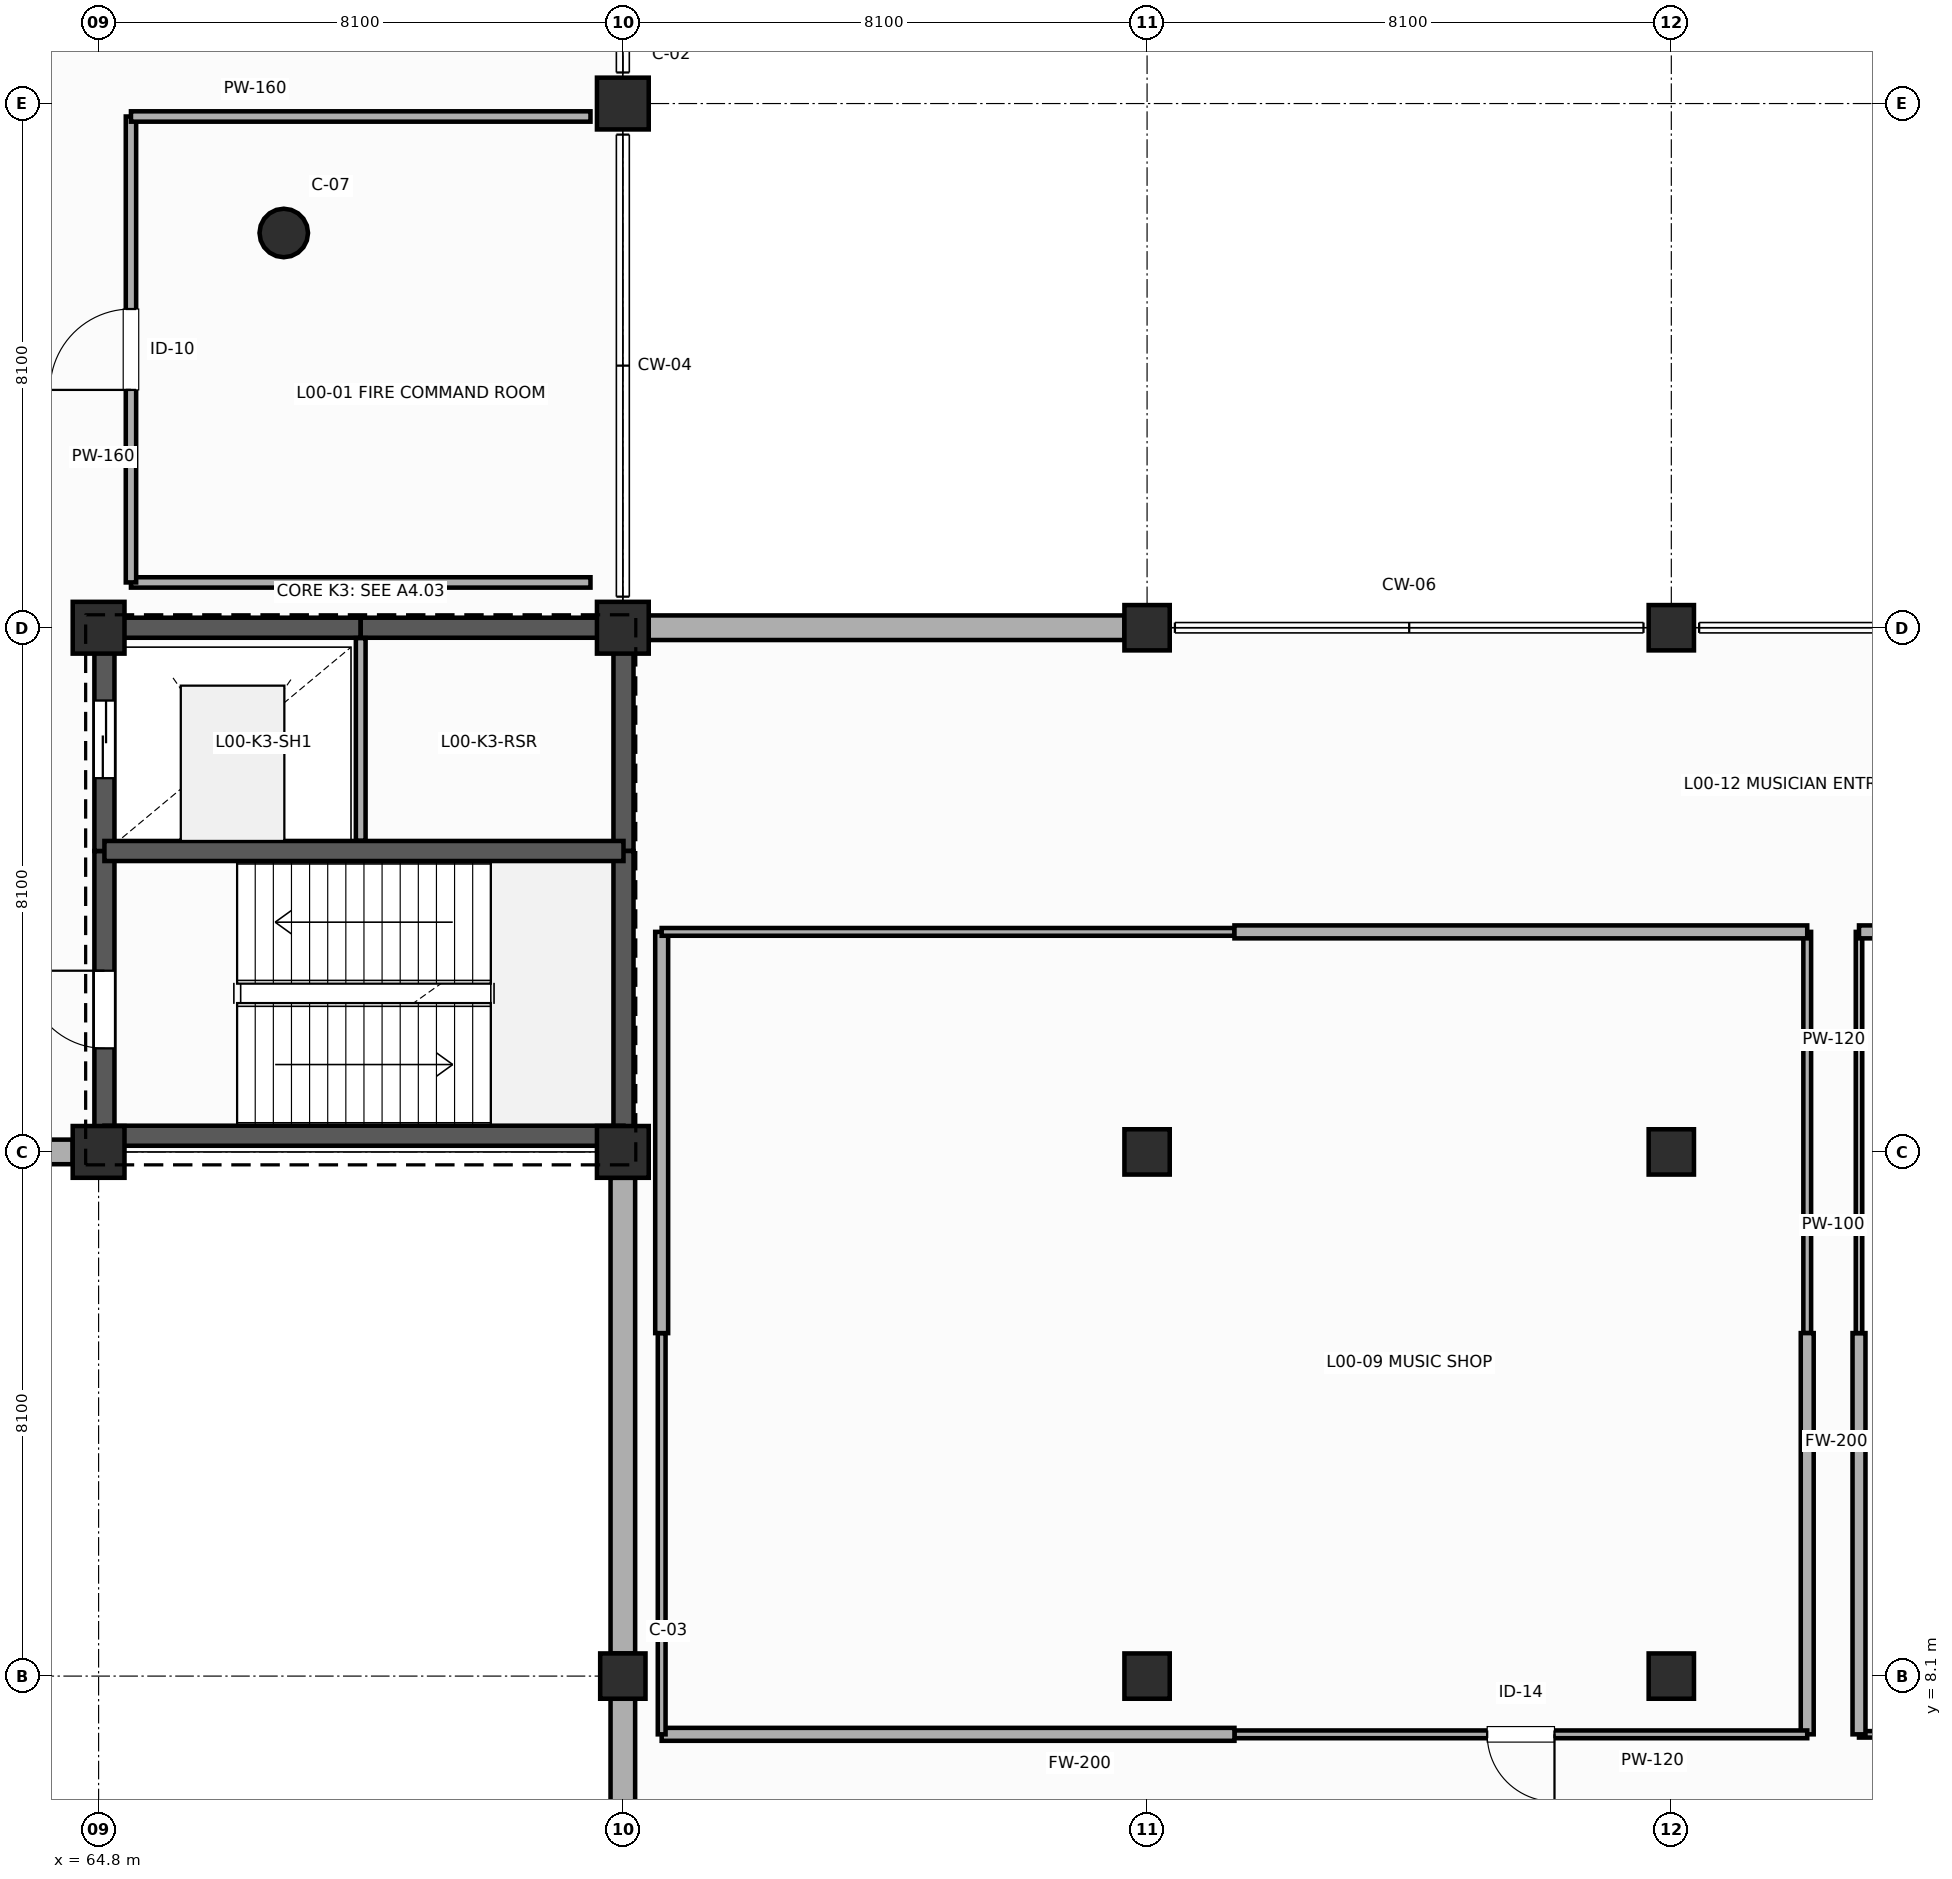
"""IFC4 building model, lengths in metres.
Left out: names, types, materials, properties, quantities, classifications, styles, units other than length and angle.
Written with IfcOpenShell. Run it as: python <this file> out.ifc"""

import sys

from ifc_helpers import new_model, si_unit, direction, frame, frame_2d, origin, origin_2d, place, context, subcontext, project, spatial, rectangle, circle, extrude, element, fill, save


model = new_model("IFC4")
c1 = context("Model", 3, precision=1e-05, world=origin(), true_north=direction((0.0, 1.0)))
c2 = subcontext(c1, "Body", "Model", "MODEL_VIEW")
j1 = project(units=[si_unit("LENGTHUNIT", "METRE"), si_unit("PLANEANGLEUNIT", "RADIAN")], contexts=[c1])
p1 = place(None, origin())
s1 = spatial("IfcSite", under=j1, at=p1, CompositionType="ELEMENT")
p2 = place(p1, origin())
s2 = spatial("IfcBuilding", under=s1, at=p2, CompositionType="ELEMENT")
p3 = place(p2, origin())
s3 = spatial("IfcBuildingStorey", under=s2, at=p3, CompositionType="ELEMENT", Elevation=0.0)
for number, where, z_axis, x_axis in (
    (1, (64.8, 16.2, 0.0), (0.0, 0.0, 1.0), (1.0, 0.0, 0.0)),
    (2, (64.8, 24.3, 0.0), (0.0, 0.0, 1.0), (1.0, 0.0, 0.0)),
):
    element("IfcColumn", number, at=place(p3, frame(where, z_axis=z_axis, x_axis=x_axis)), inside=s3, PredefinedType="COLUMN", context=c2, shape_type="SweptSolid", body=[
        extrude(rectangle(XDim=0.8, YDim=0.8, at=origin_2d()), origin(), (0.0, 0.0, 1.0), 5.4),
    ])
p4 = place(p3, frame((72.9, 8.1, 0.0), z_axis=(0.0, 0.0, 1.0), x_axis=(1.0, 0.0, 0.0)))
e3 = element("IfcColumn", 3, at=p4, inside=s3, PredefinedType="COLUMN", context=c2, shape_type="SweptSolid", body=[
    extrude(rectangle(XDim=0.7, YDim=0.7, at=origin_2d()), origin(), (0.0, 0.0, 1.0), 5.4),
])
for number, where, z_axis, x_axis in (
    (4, (72.9, 16.2, 0.0), (0.0, 0.0, 1.0), (1.0, 0.0, 0.0)),
    (5, (72.9, 24.3, 0.0), (0.0, 0.0, 1.0), (1.0, 0.0, 0.0)),
    (6, (72.9, 32.4, 0.0), (0.0, 0.0, 1.0), (1.0, 0.0, 0.0)),
):
    element("IfcColumn", number, at=place(p3, frame(where, z_axis=z_axis, x_axis=x_axis)), inside=s3, PredefinedType="COLUMN", context=c2, shape_type="SweptSolid", body=[
        extrude(rectangle(XDim=0.8, YDim=0.8, at=origin_2d()), origin(), (0.0, 0.0, 1.0), 5.4),
    ])
for number, where, z_axis, x_axis in (
    (7, (81.0, 8.1, 0.0), (0.0, 0.0, 1.0), (1.0, 0.0, 0.0)),
    (8, (81.0, 16.2, 0.0), (0.0, 0.0, 1.0), (1.0, 0.0, 0.0)),
    (9, (81.0, 24.3, 0.0), (0.0, 0.0, 1.0), (1.0, 0.0, 0.0)),
    (10, (89.1, 8.1, 0.0), (0.0, 0.0, 1.0), (1.0, 0.0, 0.0)),
    (11, (89.1, 16.2, 0.0), (0.0, 0.0, 1.0), (1.0, 0.0, 0.0)),
    (12, (89.1, 24.3, 0.0), (0.0, 0.0, 1.0), (1.0, 0.0, 0.0)),
):
    element("IfcColumn", number, at=place(p3, frame(where, z_axis=z_axis, x_axis=x_axis)), inside=s3, PredefinedType="COLUMN", context=c2, shape_type="SweptSolid", body=[
        extrude(rectangle(XDim=0.7, YDim=0.7, at=origin_2d()), origin(), (0.0, 0.0, 1.0), 5.4),
    ])
p5 = place(p3, frame((67.661, 30.4, 0.0), z_axis=(0.0, 0.0, 1.0), x_axis=(1.0, 0.0, 0.0)))
e13 = element("IfcColumn", 13, at=p5, inside=s3, PredefinedType="COLUMN", context=c2, shape_type="SweptSolid", body=[
    extrude(circle(Radius=0.375, at=origin_2d()), origin(), (0.0, 0.0, 1.0), 5.4),
])
p6 = place(p3, frame((73.3, 24.3, 0.0), z_axis=(0.0, 0.0, 1.0), x_axis=(1.0, 0.0, 0.0)))
e14 = element("IfcWall", 14, at=p6, inside=s3, PredefinedType="SOLIDWALL", context=c2, shape_type="SweptSolid", body=[
    extrude(rectangle(XDim=7.35, YDim=0.38, at=frame_2d((3.675, 0.0))), origin(), (0.0, 0.0, 1.0), 4.625),
])
p7 = place(p3, frame((56.7, 16.2, 0.0), z_axis=(0.0, 0.0, 1.0), x_axis=(1.0, 0.0, 0.0)))
e15 = element("IfcWall", 15, at=p7, inside=s3, PredefinedType="SOLIDWALL", context=c2, shape_type="SweptSolid", body=[
    extrude(rectangle(XDim=7.7, YDim=0.38, at=frame_2d((3.85, 0.0))), origin(), (0.0, 0.0, 1.0), 5.1),
])
p8 = place(p3, frame((72.9, 15.8, 0.0), z_axis=(0.0, 0.0, 1.0), x_axis=(0.0, -1.0, 0.0)))
e16 = element("IfcWall", 16, at=p8, inside=s3, PredefinedType="SOLIDWALL", context=c2, shape_type="SweptSolid", body=[
    extrude(rectangle(XDim=7.35, YDim=0.38, at=frame_2d((3.675, 0.0))), origin(), (0.0, 0.0, 1.0), 4.737),
])
p9 = place(p3, frame((72.9, 7.75, 0.0), z_axis=(0.0, 0.0, 1.0), x_axis=(0.0, -1.0, 0.0)))
e17 = element("IfcWall", 17, at=p9, inside=s3, PredefinedType="SOLIDWALL", context=c2, shape_type="SweptSolid", body=[
    extrude(rectangle(XDim=3.75, YDim=0.38, at=frame_2d((1.875, 0.0))), origin(), (0.0, 0.0, 1.0), 4.737),
])
p10 = place(p3, frame((64.89, 16.45, 0.0), z_axis=(0.0, 0.0, 1.0), x_axis=(0.0, 1.0, 0.0)))
e18 = element("IfcWall", 18, at=p10, inside=s3, PredefinedType="SHEAR", context=c2, shape_type="SweptSolid", body=[
    extrude(rectangle(XDim=4.4, YDim=0.31, at=frame_2d((2.2, 0.0))), origin(), (0.0, 0.0, 1.0), 5.4),
])
p11 = place(p10, frame((1.35, 0.0, 0.0)))
e19 = element("IfcOpeningElement", 19, at=p11, cuts=e18, PredefinedType="OPENING", context=c2, shape_type="SweptSolid", body=[
    extrude(rectangle(XDim=1.2, YDim=2.25, at=frame_2d((0.6, 1.125))), frame((0.0, 0.165, 0.0), z_axis=(0.0, -1.0, 0.0), x_axis=(1.0, 0.0, 0.0)), (0.0, 0.0, 1.0), 0.33),
])
p12 = place(p3, frame((64.89, 20.85, 0.0), z_axis=(0.0, 0.0, 1.0), x_axis=(0.0, 1.0, 0.0)))
e20 = element("IfcWall", 20, at=p12, inside=s3, PredefinedType="SHEAR", context=c2, shape_type="SweptSolid", body=[
    extrude(rectangle(XDim=3.45, YDim=0.31, at=frame_2d((1.725, 0.0))), origin(), (0.0, 0.0, 1.0), 5.4),
])
p13 = place(p12, frame((1.125, 0.0, 0.0)))
e21 = element("IfcOpeningElement", 21, at=p13, cuts=e20, PredefinedType="OPENING", context=c2, shape_type="SweptSolid", body=[
    extrude(rectangle(XDim=1.2, YDim=2.2, at=frame_2d((0.6, 1.1))), frame((0.0, 0.165, 0.0), z_axis=(0.0, -1.0, 0.0), x_axis=(1.0, 0.0, 0.0)), (0.0, 0.0, 1.0), 0.33),
])
p14 = place(p3, frame((64.89, 24.3, 0.0), z_axis=(0.0, 0.0, 1.0), x_axis=(1.0, 0.0, 0.0)))
e22 = element("IfcWall", 22, at=p14, inside=s3, PredefinedType="SHEAR", context=c2, shape_type="SweptSolid", body=[
    extrude(rectangle(XDim=3.96, YDim=0.31, at=frame_2d((1.98, 0.0))), origin(), (0.0, 0.0, 1.0), 5.4),
])
p15 = place(p3, frame((68.85, 24.3, 0.0), z_axis=(0.0, 0.0, 1.0), x_axis=(1.0, 0.0, 0.0)))
e23 = element("IfcWall", 23, at=p15, inside=s3, PredefinedType="SHEAR", context=c2, shape_type="SweptSolid", body=[
    extrude(rectangle(XDim=4.06, YDim=0.31, at=frame_2d((2.03, 0.0))), origin(), (0.0, 0.0, 1.0), 5.4),
])
p16 = place(p3, frame((72.91, 24.3, 0.0), z_axis=(0.0, 0.0, 1.0), x_axis=(0.0, -1.0, 0.0)))
e24 = element("IfcWall", 24, at=p16, inside=s3, PredefinedType="SHEAR", context=c2, shape_type="SweptSolid", body=[
    extrude(rectangle(XDim=3.45, YDim=0.31, at=frame_2d((1.725, 0.0))), origin(), (0.0, 0.0, 1.0), 5.4),
])
p17 = place(p3, frame((72.91, 20.85, 0.0), z_axis=(0.0, 0.0, 1.0), x_axis=(0.0, -1.0, 0.0)))
e25 = element("IfcWall", 25, at=p17, inside=s3, PredefinedType="SHEAR", context=c2, shape_type="SweptSolid", body=[
    extrude(rectangle(XDim=4.4, YDim=0.31, at=frame_2d((2.2, 0.0))), origin(), (0.0, 0.0, 1.0), 5.4),
])
for number, where, z_axis, x_axis in (
    (26, (72.91, 16.45, 0.0), (0.0, 0.0, 1.0), (-1.0, 0.0, 0.0)),
    (27, (64.89, 20.85, 0.0), (0.0, 0.0, 1.0), (1.0, 0.0, 0.0)),
):
    element("IfcWall", number, at=place(p3, frame(where, z_axis=z_axis, x_axis=x_axis)), inside=s3, PredefinedType="SHEAR", context=c2, shape_type="SweptSolid", body=[
        extrude(rectangle(XDim=8.02, YDim=0.31, at=frame_2d((4.01, 0.0))), origin(), (0.0, 0.0, 1.0), 5.4),
    ])
p18 = place(p3, frame((68.85, 21.01, 0.0), z_axis=(0.0, 0.0, 1.0), x_axis=(0.0, 1.0, 0.0)))
e28 = element("IfcWall", 28, at=p18, inside=s3, PredefinedType="PLUMBINGWALL", context=c2, shape_type="SweptSolid", body=[
    extrude(rectangle(XDim=3.13, YDim=0.15, at=frame_2d((1.565, 0.0))), origin(), (0.0, 0.0, 1.0), 5.05),
])
p19 = place(p3, frame((72.4, 25.0, 0.0), z_axis=(0.0, 0.0, 1.0), x_axis=(-1.0, 0.0, 0.0)))
e29 = element("IfcWall", 29, at=p19, inside=s3, PredefinedType="PARTITIONING", context=c2, shape_type="SweptSolid", body=[
    extrude(rectangle(XDim=7.1, YDim=0.16, at=frame_2d((3.55, 0.0))), origin(), (0.0, 0.0, 1.0), 5.12),
])
p20 = place(p3, frame((65.3, 25.0, 0.0), z_axis=(0.0, 0.0, 1.0), x_axis=(0.0, 1.0, 0.0)))
e30 = element("IfcWall", 30, at=p20, inside=s3, PredefinedType="PARTITIONING", context=c2, shape_type="SweptSolid", body=[
    extrude(rectangle(XDim=7.2, YDim=0.16, at=frame_2d((3.6, 0.0))), origin(), (0.0, 0.0, 1.0), 5.12),
])
p21 = place(p20, frame((2.975, 0.0, 0.0)))
e31 = element("IfcOpeningElement", 31, at=p21, cuts=e30, PredefinedType="OPENING", context=c2, shape_type="SweptSolid", body=[
    extrude(rectangle(XDim=1.25, YDim=2.25, at=frame_2d((0.625, 1.125))), frame((0.0, 0.09, 0.0), z_axis=(0.0, -1.0, 0.0), x_axis=(1.0, 0.0, 0.0)), (0.0, 0.0, 1.0), 0.18),
])
p22 = place(p3, frame((65.3, 32.2, 0.0), z_axis=(0.0, 0.0, 1.0), x_axis=(1.0, 0.0, 0.0)))
e32 = element("IfcWall", 32, at=p22, inside=s3, PredefinedType="PARTITIONING", context=c2, shape_type="SweptSolid", body=[
    extrude(rectangle(XDim=7.1, YDim=0.16, at=frame_2d((3.55, 0.0))), origin(), (0.0, 0.0, 1.0), 5.12),
])
p23 = place(p3, frame((91.2, 19.6, 0.0), z_axis=(0.0, 0.0, 1.0), x_axis=(0.0, -1.0, 0.0)))
e33 = element("IfcWall", 33, at=p23, inside=s3, PredefinedType="PARTITIONING", context=c2, shape_type="SweptSolid", body=[
    extrude(rectangle(XDim=6.2, YDim=0.12, at=frame_2d((3.1, 0.0))), origin(), (0.0, 0.0, 1.0), 5.12),
])
p24 = place(p3, frame((91.2, 13.4, 0.0), z_axis=(0.0, 0.0, 1.0), x_axis=(0.0, -1.0, 0.0)))
e34 = element("IfcWall", 34, at=p24, inside=s3, PredefinedType="PARTITIONING", context=c2, shape_type="SweptSolid", body=[
    extrude(rectangle(XDim=6.2, YDim=0.2, at=frame_2d((3.1, 0.0))), origin(), (0.0, 0.0, 1.0), 5.12),
])
p25 = place(p3, frame((91.2, 7.2, 0.0), z_axis=(0.0, 0.0, 1.0), x_axis=(-1.0, 0.0, 0.0)))
e35 = element("IfcWall", 35, at=p25, inside=s3, PredefinedType="PARTITIONING", context=c2, shape_type="SweptSolid", body=[
    extrude(rectangle(XDim=8.85, YDim=0.12, at=frame_2d((4.425, 0.0))), origin(), (0.0, 0.0, 1.0), 5.12),
])
p26 = place(p25, frame((3.905, 0.0, 0.0)))
e36 = element("IfcOpeningElement", 36, at=p26, cuts=e35, PredefinedType="OPENING", context=c2, shape_type="SweptSolid", body=[
    extrude(rectangle(XDim=1.04, YDim=2.2, at=frame_2d((0.52, 1.1))), frame((0.0, 0.07, 0.0), z_axis=(0.0, -1.0, 0.0), x_axis=(1.0, 0.0, 0.0)), (0.0, 0.0, 1.0), 0.14),
])
p27 = place(p3, frame((82.35, 7.2, 0.0), z_axis=(0.0, 0.0, 1.0), x_axis=(-1.0, 0.0, 0.0)))
e37 = element("IfcWall", 37, at=p27, inside=s3, PredefinedType="PARTITIONING", context=c2, shape_type="SweptSolid", body=[
    extrude(rectangle(XDim=8.85, YDim=0.2, at=frame_2d((4.425, 0.0))), origin(), (0.0, 0.0, 1.0), 5.12),
])
p28 = place(p3, frame((73.5, 7.2, 0.0), z_axis=(0.0, 0.0, 1.0), x_axis=(0.0, 1.0, 0.0)))
e38 = element("IfcWall", 38, at=p28, inside=s3, PredefinedType="PARTITIONING", context=c2, shape_type="SweptSolid", body=[
    extrude(rectangle(XDim=6.2, YDim=0.12, at=frame_2d((3.1, 0.0))), origin(), (0.0, 0.0, 1.0), 5.12),
])
p29 = place(p3, frame((73.5, 13.4, 0.0), z_axis=(0.0, 0.0, 1.0), x_axis=(0.0, 1.0, 0.0)))
e39 = element("IfcWall", 39, at=p29, inside=s3, PredefinedType="PARTITIONING", context=c2, shape_type="SweptSolid", body=[
    extrude(rectangle(XDim=6.2, YDim=0.2, at=frame_2d((3.1, 0.0))), origin(), (0.0, 0.0, 1.0), 5.12),
])
p30 = place(p3, frame((73.5, 19.6, 0.0), z_axis=(0.0, 0.0, 1.0), x_axis=(1.0, 0.0, 0.0)))
e40 = element("IfcWall", 40, at=p30, inside=s3, PredefinedType="PARTITIONING", context=c2, shape_type="SweptSolid", body=[
    extrude(rectangle(XDim=8.85, YDim=0.12, at=frame_2d((4.425, 0.0))), origin(), (0.0, 0.0, 1.0), 5.12),
])
p31 = place(p3, frame((82.35, 19.6, 0.0), z_axis=(0.0, 0.0, 1.0), x_axis=(1.0, 0.0, 0.0)))
e41 = element("IfcWall", 41, at=p31, inside=s3, PredefinedType="PARTITIONING", context=c2, shape_type="SweptSolid", body=[
    extrude(rectangle(XDim=8.85, YDim=0.2, at=frame_2d((4.425, 0.0))), origin(), (0.0, 0.0, 1.0), 5.12),
])
p32 = place(p3, frame((98.933, 7.2, 0.0), z_axis=(0.0, 0.0, 1.0), x_axis=(-1.0, 0.0, 0.0)))
e42 = element("IfcWall", 42, at=p32, inside=s3, PredefinedType="PARTITIONING", context=c2, shape_type="SweptSolid", body=[
    extrude(rectangle(XDim=6.933, YDim=0.1, at=frame_2d((3.467, 0.0))), origin(), (0.0, 0.0, 1.0), 5.12),
])
p33 = place(p3, frame((92.0, 7.2, 0.0), z_axis=(0.0, 0.0, 1.0), x_axis=(0.0, 1.0, 0.0)))
e43 = element("IfcWall", 43, at=p33, inside=s3, PredefinedType="PARTITIONING", context=c2, shape_type="SweptSolid", body=[
    extrude(rectangle(XDim=6.2, YDim=0.2, at=frame_2d((3.1, 0.0))), origin(), (0.0, 0.0, 1.0), 5.12),
])
p34 = place(p3, frame((92.0, 13.4, 0.0), z_axis=(0.0, 0.0, 1.0), x_axis=(0.0, 1.0, 0.0)))
e44 = element("IfcWall", 44, at=p34, inside=s3, PredefinedType="PARTITIONING", context=c2, shape_type="SweptSolid", body=[
    extrude(rectangle(XDim=6.2, YDim=0.1, at=frame_2d((3.1, 0.0))), origin(), (0.0, 0.0, 1.0), 5.12),
])
p35 = place(p3, frame((92.0, 19.6, 0.0), z_axis=(0.0, 0.0, 1.0), x_axis=(1.0, 0.0, 0.0)))
e45 = element("IfcWall", 45, at=p35, inside=s3, PredefinedType="PARTITIONING", context=c2, shape_type="SweptSolid", body=[
    extrude(rectangle(XDim=6.933, YDim=0.2, at=frame_2d((3.467, 0.0))), origin(), (0.0, 0.0, 1.0), 5.12),
])
p36 = place(p11, origin())
e46 = element("IfcDoor", 46, at=p36, inside=s3, OperationType="SINGLE_SWING_RIGHT", PredefinedType="DOOR", context=c2, shape_type="SweptSolid", body=[
    extrude(rectangle(XDim=1.2, YDim=2.25, at=frame_2d((0.6, 1.125))), frame((0.0, 0.025, 0.0), z_axis=(0.0, -1.0, 0.0), x_axis=(1.0, 0.0, 0.0)), (0.0, 0.0, 1.0), 0.05),
])
fill(e19, e46)
p37 = place(p13, origin())
e47 = element("IfcDoor", 47, at=p37, inside=s3, OperationType="SLIDING_TO_LEFT", PredefinedType="DOOR", context=c2, shape_type="SweptSolid", body=[
    extrude(rectangle(XDim=1.2, YDim=2.2, at=frame_2d((0.6, 1.1))), frame((0.0, 0.025, 0.0), z_axis=(0.0, -1.0, 0.0), x_axis=(1.0, 0.0, 0.0)), (0.0, 0.0, 1.0), 0.05),
])
fill(e21, e47)
p38 = place(p21, origin())
e48 = element("IfcDoor", 48, at=p38, inside=s3, OperationType="SINGLE_SWING_LEFT", PredefinedType="DOOR", context=c2, shape_type="SweptSolid", body=[
    extrude(rectangle(XDim=1.25, YDim=2.25, at=frame_2d((0.625, 1.125))), frame((0.0, 0.025, 0.0), z_axis=(0.0, -1.0, 0.0), x_axis=(1.0, 0.0, 0.0)), (0.0, 0.0, 1.0), 0.05),
])
fill(e31, e48)
p39 = place(p26, origin())
e49 = element("IfcDoor", 49, at=p39, inside=s3, OperationType="SINGLE_SWING_LEFT", PredefinedType="DOOR", context=c2, shape_type="SweptSolid", body=[
    extrude(rectangle(XDim=1.04, YDim=2.2, at=frame_2d((0.52, 1.1))), frame((0.0, 0.025, 0.0), z_axis=(0.0, -1.0, 0.0), x_axis=(1.0, 0.0, 0.0)), (0.0, 0.0, 1.0), 0.05),
])
fill(e36, e49)
save(model, sys.argv[1])
